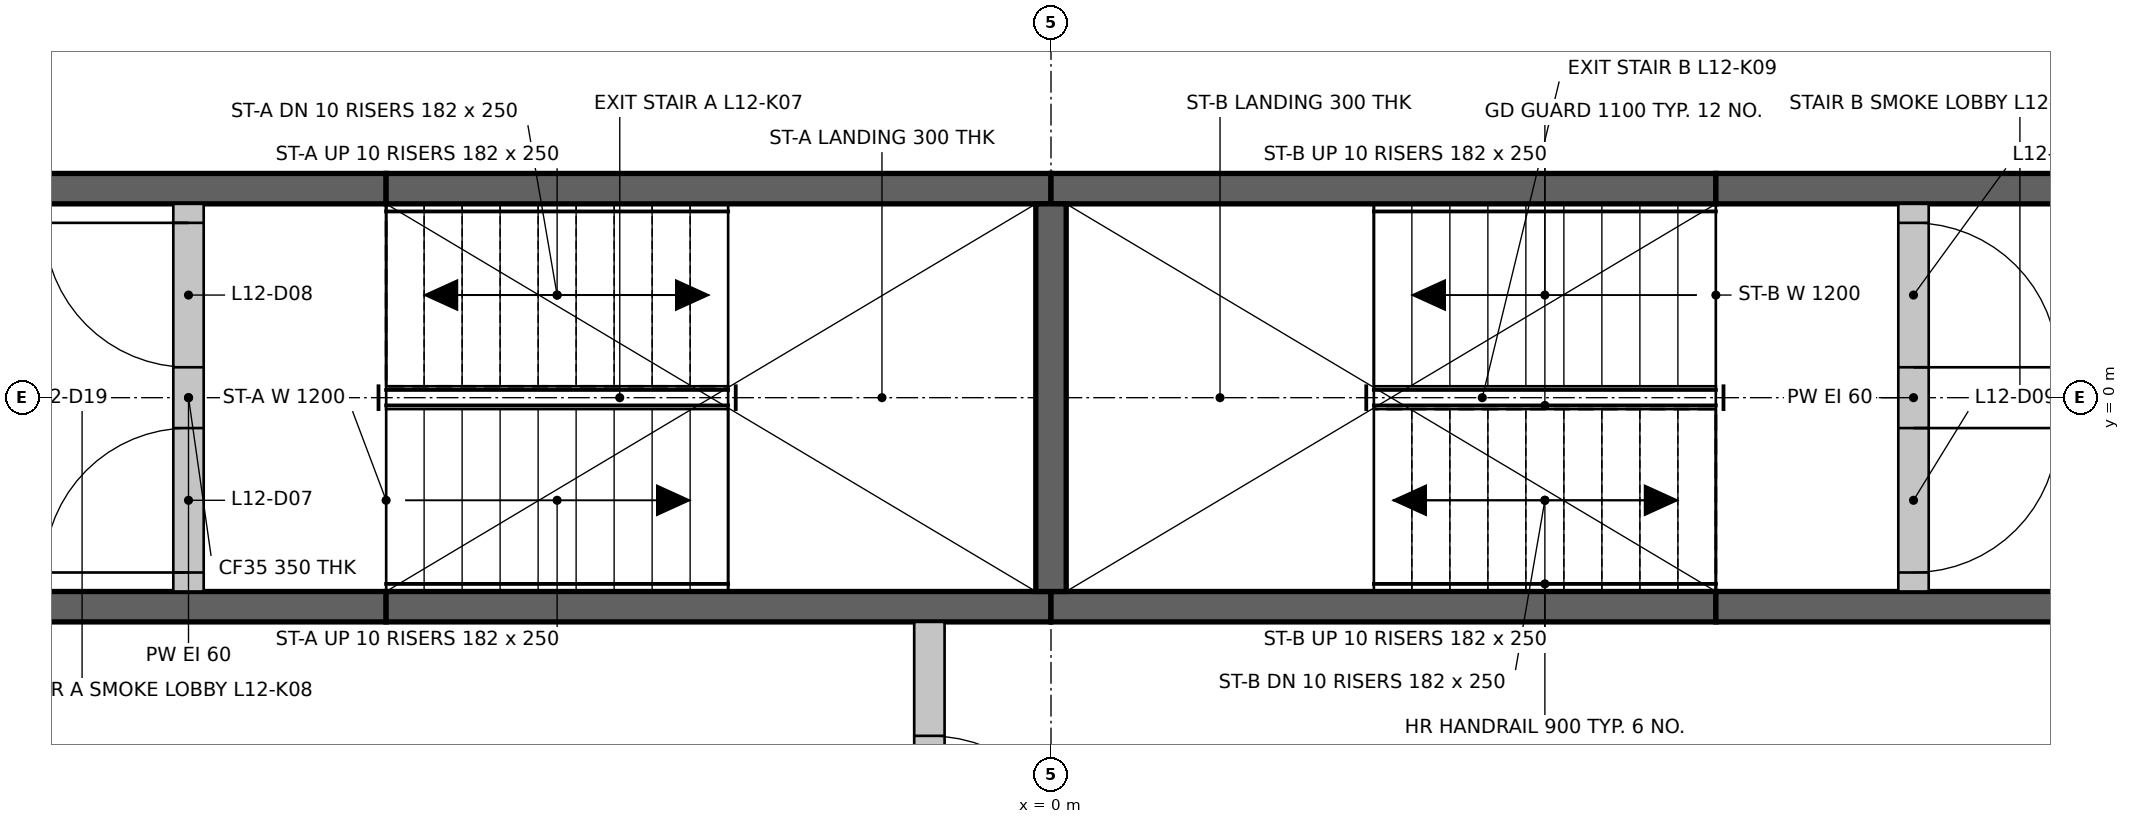
"""IFC4 building model, lengths in metres.
Left out: names, types, materials, properties, quantities, classifications, styles, units other than length and angle.
Written with IfcOpenShell. Run it as: python <this file> out.ifc"""

import sys

from ifc_helpers import new_model, si_unit, direction, frame, frame_2d, origin, place, context, subcontext, project, spatial, rectangle, extrude, element, fill, save


model = new_model("IFC4")
c1 = context("Model", 3, precision=1e-05, world=origin(), true_north=direction((0.0, 1.0)))
c2 = subcontext(c1, "Body", "Model", "MODEL_VIEW")
j1 = project(units=[si_unit("LENGTHUNIT", "METRE"), si_unit("PLANEANGLEUNIT", "RADIAN")], contexts=[c1])
p1 = place(None, origin())
s1 = spatial("IfcSite", under=j1, at=p1, CompositionType="ELEMENT")
p2 = place(p1, origin())
s2 = spatial("IfcBuilding", under=s1, at=p2, CompositionType="ELEMENT")
p3 = place(p2, frame((0.0, 0.0, 55.4)))
s3 = spatial("IfcBuildingStorey", under=s2, at=p3, CompositionType="ELEMENT", Elevation=55.4)
p4 = place(p3, frame((-6.974, -1.375, 0.0), z_axis=(0.0, 0.0, 1.0), x_axis=(1.0, 0.0, 0.0)))
e1 = element("IfcWall", 1, at=p4, inside=s3, PredefinedType="SHEAR", context=c2, shape_type="SweptSolid", body=[
    extrude(rectangle(XDim=2.6, YDim=0.2, at=frame_2d((1.3, 0.0))), origin(), (0.0, 0.0, 1.0), 3.3),
])
for number, where, z_axis, x_axis in (
    (2, (-4.374, -1.375, 0.0), (0.0, 0.0, 1.0), (1.0, 0.0, 0.0)),
    (3, (0.0, -1.375, 0.0), (0.0, 0.0, 1.0), (1.0, 0.0, 0.0)),
):
    element("IfcWall", number, at=place(p3, frame(where, z_axis=z_axis, x_axis=x_axis)), inside=s3, PredefinedType="SHEAR", context=c2, shape_type="SweptSolid", body=[
        extrude(rectangle(XDim=4.374, YDim=0.2, at=frame_2d((2.187, 0.0))), origin(), (0.0, 0.0, 1.0), 3.3),
    ])
for number, where, z_axis, x_axis in (
    (4, (4.374, -1.375, 0.0), (0.0, 0.0, 1.0), (1.0, 0.0, 0.0)),
    (5, (-6.974, 1.375, 0.0), (0.0, 0.0, 1.0), (1.0, 0.0, 0.0)),
):
    element("IfcWall", number, at=place(p3, frame(where, z_axis=z_axis, x_axis=x_axis)), inside=s3, PredefinedType="SHEAR", context=c2, shape_type="SweptSolid", body=[
        extrude(rectangle(XDim=2.6, YDim=0.2, at=frame_2d((1.3, 0.0))), origin(), (0.0, 0.0, 1.0), 3.3),
    ])
for number, where, z_axis, x_axis in (
    (6, (-4.374, 1.375, 0.0), (0.0, 0.0, 1.0), (1.0, 0.0, 0.0)),
    (7, (0.0, 1.375, 0.0), (0.0, 0.0, 1.0), (1.0, 0.0, 0.0)),
):
    element("IfcWall", number, at=place(p3, frame(where, z_axis=z_axis, x_axis=x_axis)), inside=s3, PredefinedType="SHEAR", context=c2, shape_type="SweptSolid", body=[
        extrude(rectangle(XDim=4.374, YDim=0.2, at=frame_2d((2.187, 0.0))), origin(), (0.0, 0.0, 1.0), 3.3),
    ])
p5 = place(p3, frame((4.374, 1.375, 0.0), z_axis=(0.0, 0.0, 1.0), x_axis=(1.0, 0.0, 0.0)))
e8 = element("IfcWall", 8, at=p5, inside=s3, PredefinedType="SHEAR", context=c2, shape_type="SweptSolid", body=[
    extrude(rectangle(XDim=2.6, YDim=0.2, at=frame_2d((1.3, 0.0))), origin(), (0.0, 0.0, 1.0), 3.3),
])
p6 = place(p3, frame((0.0, -1.275, 0.0), z_axis=(0.0, 0.0, 1.0), x_axis=(0.0, 1.0, 0.0)))
e9 = element("IfcWall", 9, at=p6, inside=s3, PredefinedType="SHEAR", context=c2, shape_type="SweptSolid", body=[
    extrude(rectangle(XDim=2.55, YDim=0.2, at=frame_2d((1.275, 0.0))), origin(), (0.0, 0.0, 1.0), 3.3),
])
p7 = place(p3, frame((-0.8, -3.974, 0.0), z_axis=(0.0, 0.0, 1.0), x_axis=(0.0, 1.0, 0.0)))
e10 = element("IfcWall", 10, at=p7, inside=s3, PredefinedType="PARTITIONING", context=c2, shape_type="SweptSolid", body=[
    extrude(rectangle(XDim=2.499, YDim=0.2, at=frame_2d((1.25, 0.0))), origin(), (0.0, 0.0, 1.0), 3.3),
])
p8 = place(p7, frame((0.75, 0.0, 0.0)))
e11 = element("IfcOpeningElement", 11, at=p8, cuts=e10, PredefinedType="OPENING", context=c2, shape_type="SweptSolid", body=[
    extrude(rectangle(XDim=1.0, YDim=2.1, at=frame_2d((0.5, 1.05))), frame((0.0, 0.11, 0.0), z_axis=(0.0, -1.0, 0.0), x_axis=(1.0, 0.0, 0.0)), (0.0, 0.0, 1.0), 0.22),
])
p9 = place(p3, frame((-5.674, -1.275, 0.0), z_axis=(0.0, 0.0, 1.0), x_axis=(0.0, 1.0, 0.0)))
e12 = element("IfcWall", 12, at=p9, inside=s3, PredefinedType="PARTITIONING", context=c2, shape_type="SweptSolid", body=[
    extrude(rectangle(XDim=2.55, YDim=0.2, at=frame_2d((1.275, 0.0))), origin(), (0.0, 0.0, 1.0), 3.3),
])
p10 = place(p9, frame((0.125, 0.0, 0.0)))
e13 = element("IfcOpeningElement", 13, at=p10, cuts=e12, PredefinedType="OPENING", context=c2, shape_type="SweptSolid", body=[
    extrude(rectangle(XDim=0.95, YDim=2.1, at=frame_2d((0.475, 1.05))), frame((0.0, 0.11, 0.0), z_axis=(0.0, -1.0, 0.0), x_axis=(1.0, 0.0, 0.0)), (0.0, 0.0, 1.0), 0.22),
])
p11 = place(p9, frame((1.475, 0.0, 0.0)))
e14 = element("IfcOpeningElement", 14, at=p11, cuts=e12, PredefinedType="OPENING", context=c2, shape_type="SweptSolid", body=[
    extrude(rectangle(XDim=0.95, YDim=2.1, at=frame_2d((0.475, 1.05))), frame((0.0, 0.11, 0.0), z_axis=(0.0, -1.0, 0.0), x_axis=(1.0, 0.0, 0.0)), (0.0, 0.0, 1.0), 0.22),
])
p12 = place(p3, frame((5.674, -1.275, 0.0), z_axis=(0.0, 0.0, 1.0), x_axis=(0.0, 1.0, 0.0)))
e15 = element("IfcWall", 15, at=p12, inside=s3, PredefinedType="PARTITIONING", context=c2, shape_type="SweptSolid", body=[
    extrude(rectangle(XDim=2.55, YDim=0.2, at=frame_2d((1.275, 0.0))), origin(), (0.0, 0.0, 1.0), 3.3),
])
p13 = place(p12, frame((0.125, 0.0, 0.0)))
e16 = element("IfcOpeningElement", 16, at=p13, cuts=e15, PredefinedType="OPENING", context=c2, shape_type="SweptSolid", body=[
    extrude(rectangle(XDim=0.95, YDim=2.1, at=frame_2d((0.475, 1.05))), frame((0.0, 0.11, 0.0), z_axis=(0.0, -1.0, 0.0), x_axis=(1.0, 0.0, 0.0)), (0.0, 0.0, 1.0), 0.22),
])
p14 = place(p12, frame((1.475, 0.0, 0.0)))
e17 = element("IfcOpeningElement", 17, at=p14, cuts=e15, PredefinedType="OPENING", context=c2, shape_type="SweptSolid", body=[
    extrude(rectangle(XDim=0.95, YDim=2.1, at=frame_2d((0.475, 1.05))), frame((0.0, 0.11, 0.0), z_axis=(0.0, -1.0, 0.0), x_axis=(1.0, 0.0, 0.0)), (0.0, 0.0, 1.0), 0.22),
])
p15 = place(p10, origin())
e18 = element("IfcDoor", 18, at=p15, inside=s3, OperationType="SINGLE_SWING_LEFT", PredefinedType="DOOR", context=c2, shape_type="SweptSolid", body=[
    extrude(rectangle(XDim=0.95, YDim=2.1, at=frame_2d((0.475, 1.05))), frame((0.0, 0.025, 0.0), z_axis=(0.0, -1.0, 0.0), x_axis=(1.0, 0.0, 0.0)), (0.0, 0.0, 1.0), 0.05),
])
fill(e13, e18)
p16 = place(p11, origin())
e19 = element("IfcDoor", 19, at=p16, inside=s3, OperationType="SINGLE_SWING_RIGHT", PredefinedType="DOOR", context=c2, shape_type="SweptSolid", body=[
    extrude(rectangle(XDim=0.95, YDim=2.1, at=frame_2d((0.475, 1.05))), frame((0.0, 0.025, 0.0), z_axis=(0.0, -1.0, 0.0), x_axis=(1.0, 0.0, 0.0)), (0.0, 0.0, 1.0), 0.05),
])
fill(e14, e19)
p17 = place(p13, frame((0.95, 0.0, 0.0), z_axis=(0.0, 0.0, 1.0), x_axis=(-1.0, 0.0, 0.0)))
e20 = element("IfcDoor", 20, at=p17, inside=s3, OperationType="SINGLE_SWING_RIGHT", PredefinedType="DOOR", context=c2, shape_type="SweptSolid", body=[
    extrude(rectangle(XDim=0.95, YDim=2.1, at=frame_2d((0.475, 1.05))), frame((0.0, 0.025, 0.0), z_axis=(0.0, -1.0, 0.0), x_axis=(1.0, 0.0, 0.0)), (0.0, 0.0, 1.0), 0.05),
])
fill(e16, e20)
p18 = place(p14, frame((0.95, 0.0, 0.0), z_axis=(0.0, 0.0, 1.0), x_axis=(-1.0, 0.0, 0.0)))
e21 = element("IfcDoor", 21, at=p18, inside=s3, OperationType="SINGLE_SWING_LEFT", PredefinedType="DOOR", context=c2, shape_type="SweptSolid", body=[
    extrude(rectangle(XDim=0.95, YDim=2.1, at=frame_2d((0.475, 1.05))), frame((0.0, 0.025, 0.0), z_axis=(0.0, -1.0, 0.0), x_axis=(1.0, 0.0, 0.0)), (0.0, 0.0, 1.0), 0.05),
])
fill(e17, e21)
p19 = place(p8, frame((1.0, 0.0, 0.0), z_axis=(0.0, 0.0, 1.0), x_axis=(-1.0, 0.0, 0.0)))
e22 = element("IfcDoor", 22, at=p19, inside=s3, OperationType="SINGLE_SWING_LEFT", PredefinedType="DOOR", context=c2, shape_type="SweptSolid", body=[
    extrude(rectangle(XDim=1.0, YDim=2.1, at=frame_2d((0.5, 1.05))), frame((0.0, 0.025, 0.0), z_axis=(0.0, -1.0, 0.0), x_axis=(1.0, 0.0, 0.0)), (0.0, 0.0, 1.0), 0.05),
])
fill(e11, e22)
save(model, sys.argv[1])
